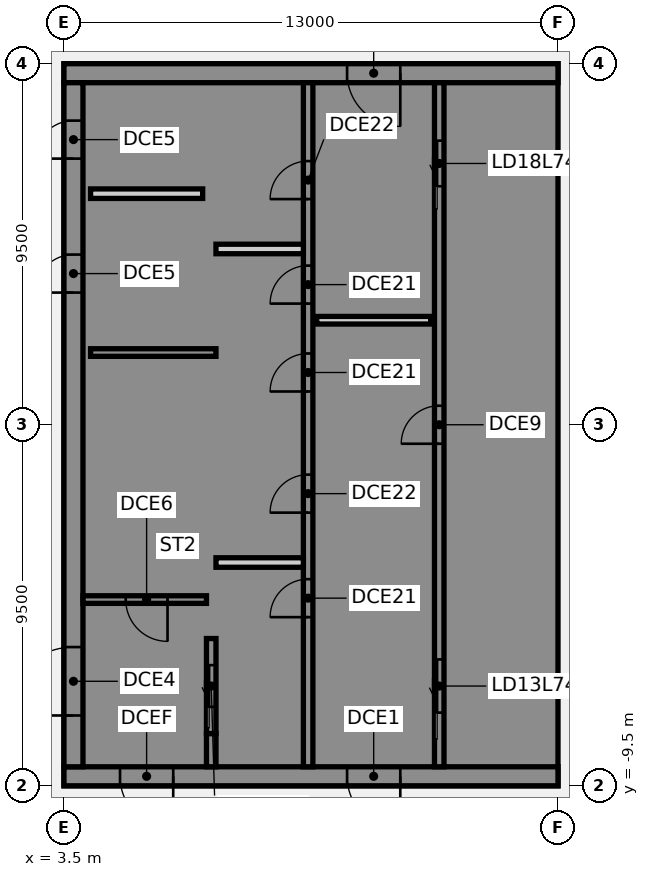
"""IFC4 building model, lengths in metres.
Left out: names, types, materials, properties, quantities, classifications, styles, units other than length and angle.
Written with IfcOpenShell. Run it as: python <this file> out.ifc"""

import sys

from ifc_helpers import new_model, si_unit, direction, frame, frame_2d, origin, place, context, subcontext, project, spatial, polyline, rectangle, outline, extrude, element, fill, save


model = new_model("IFC4")
c1 = context("Model", 3, precision=1e-05, world=origin(), true_north=direction((0.0, 1.0)))
c2 = subcontext(c1, "Body", "Model", "MODEL_VIEW")
j1 = project(units=[si_unit("LENGTHUNIT", "METRE"), si_unit("PLANEANGLEUNIT", "RADIAN")], contexts=[c1])
p1 = place(None, origin())
s1 = spatial("IfcSite", under=j1, at=p1, CompositionType="ELEMENT")
p2 = place(p1, origin())
s2 = spatial("IfcBuilding", under=s1, at=p2, CompositionType="ELEMENT")
p3 = place(p2, frame((0.0, 0.0, 299.4)))
s3 = spatial("IfcBuildingStorey", under=s2, at=p3, CompositionType="ELEMENT", Elevation=299.4)
p4 = place(p3, frame((16.5, -9.25, 0.0), z_axis=(0.0, 0.0, 1.0), x_axis=(-1.0, 0.0, 0.0)))
e1 = element("IfcWall", 1, at=p4, inside=s3, PredefinedType="SHEAR", context=c2, shape_type="SweptSolid", body=[
    extrude(rectangle(XDim=13.0, YDim=0.5, at=frame_2d((6.5, 0.0))), origin(), (0.0, 0.0, 1.0), 5.82),
])
p5 = place(p4, frame((4.15, 0.0, 0.0)))
e2 = element("IfcOpeningElement", 2, at=p5, cuts=e1, PredefinedType="OPENING", context=c2, shape_type="SweptSolid", body=[
    extrude(rectangle(XDim=1.4, YDim=2.1, at=frame_2d((0.7, 1.05))), frame((0.0, 0.26, 0.0), z_axis=(0.0, -1.0, 0.0), x_axis=(1.0, 0.0, 0.0)), (0.0, 0.0, 1.0), 0.52),
])
p6 = place(p4, frame((10.125, 0.0, 0.0)))
e3 = element("IfcOpeningElement", 3, at=p6, cuts=e1, PredefinedType="OPENING", context=c2, shape_type="SweptSolid", body=[
    extrude(rectangle(XDim=1.4, YDim=2.1, at=frame_2d((0.7, 1.05))), frame((0.0, 0.26, 0.0), z_axis=(0.0, -1.0, 0.0), x_axis=(1.0, 0.0, 0.0)), (0.0, 0.0, 1.0), 0.52),
])
p7 = place(p3, frame((16.5, 9.25, 0.0), z_axis=(0.0, 0.0, 1.0), x_axis=(-1.0, 0.0, 0.0)))
e4 = element("IfcWall", 4, at=p7, inside=s3, PredefinedType="SHEAR", context=c2, shape_type="SweptSolid", body=[
    extrude(rectangle(XDim=13.0, YDim=0.5, at=frame_2d((6.5, 0.0))), origin(), (0.0, 0.0, 1.0), 5.82),
])
p8 = place(p7, frame((4.15, 0.0, 0.0)))
e5 = element("IfcOpeningElement", 5, at=p8, cuts=e4, PredefinedType="OPENING", context=c2, shape_type="SweptSolid", body=[
    extrude(rectangle(XDim=1.4, YDim=2.1, at=frame_2d((0.7, 1.05))), frame((0.0, 0.26, 0.0), z_axis=(0.0, -1.0, 0.0), x_axis=(1.0, 0.0, 0.0)), (0.0, 0.0, 1.0), 0.52),
])
p9 = place(p3, frame((13.15, 2.75, 0.0), z_axis=(0.0, 0.0, 1.0), x_axis=(-1.0, 0.0, 0.0)))
e6 = element("IfcWall", 6, at=p9, inside=s3, PredefinedType="PARTITIONING", context=c2, shape_type="SweptSolid", body=[
    extrude(rectangle(XDim=3.0, YDim=0.2, at=frame_2d((1.5, 0.0))), origin(), (0.0, 0.0, 1.0), 5.82),
])
p10 = place(p3, origin())
e7 = element("IfcWall", 7, at=p10, inside=s3, PredefinedType="SHEAR", context=c2, shape_type="SweptSolid", body=[
    extrude(outline(polyline([(13.5, -8.125), (13.5, -9.0), (16.0, -9.0), (16.5, -9.0), (16.5, 9.0), (16.0, 9.0), (13.5, 9.0), (13.5, 8.125), (16.0, 8.125), (16.0, 5.625), (13.5, 5.625), (13.5, 5.375), (16.0, 5.375), (16.0, -5.375), (13.5, -5.375), (13.5, -5.625), (16.0, -5.625), (16.0, -8.125), (13.5, -8.125)])), origin(), (0.0, 0.0, 1.0), 5.82),
])
p11 = place(p3, origin())
e8 = element("IfcWall", 8, at=p11, inside=s3, PredefinedType="SHEAR", context=c2, shape_type="SweptSolid", body=[
    extrude(outline(polyline([(9.8, -5.625), (9.8, -5.375), (7.5, -5.375), (7.5, 8.125), (9.8, 8.125), (9.8, 9.0), (7.5, 9.0), (7.25, 9.0), (7.25, -5.625), (7.5, -5.625), (9.8, -5.625)])), origin(), (0.0, 0.0, 1.0), 5.82),
])
p12 = place(p3, origin())
e9 = element("IfcWall", 9, at=p12, inside=s3, PredefinedType="SHEAR", context=c2, shape_type="SweptSolid", body=[
    extrude(outline(polyline([(7.5, -8.125), (7.5, -9.0), (9.8, -9.0), (9.8, -8.125), (9.8, -5.625), (9.55, -5.625), (9.55, -8.125), (7.5, -8.125)])), origin(), (0.0, 0.0, 1.0), 5.82),
])
p13 = place(p3, frame((7.375, -9.0, 0.0), z_axis=(0.0, 0.0, 1.0), x_axis=(0.0, 1.0, 0.0)))
e10 = element("IfcWall", 10, at=p13, inside=s3, PredefinedType="SHEAR", context=c2, shape_type="SweptSolid", body=[
    extrude(rectangle(XDim=0.875, YDim=0.25, at=frame_2d((0.438, 0.0))), origin(), (0.0, 0.0, 1.0), 5.82),
])
p14 = place(p3, frame((7.5, 1.9, 0.0), z_axis=(0.0, 0.0, 1.0), x_axis=(-1.0, 0.0, 0.0)))
e11 = element("IfcWall", 11, at=p14, inside=s3, PredefinedType="SHEAR", context=c2, shape_type="SweptSolid", body=[
    extrude(rectangle(XDim=3.3, YDim=0.2, at=frame_2d((1.65, 0.0))), origin(), (0.0, 0.0, 1.0), 5.82),
])
p15 = place(p3, frame((13.375, -9.0, 0.0), z_axis=(0.0, 0.0, 1.0), x_axis=(0.0, 1.0, 0.0)))
e12 = element("IfcWall", 12, at=p15, inside=s3, PredefinedType="SHEAR", context=c2, shape_type="SweptSolid", body=[
    extrude(rectangle(XDim=18.0, YDim=0.25, at=frame_2d((9.0, 0.0))), origin(), (0.0, 0.0, 1.0), 5.82),
])
p16 = place(p15, frame((1.425, 0.0, 0.0)))
e13 = element("IfcOpeningElement", 13, at=p16, cuts=e12, PredefinedType="OPENING", context=c2, shape_type="SweptSolid", body=[
    extrude(rectangle(XDim=1.4, YDim=2.1, at=frame_2d((0.7, 1.05))), frame((0.0, 0.135, 0.0), z_axis=(0.0, -1.0, 0.0), x_axis=(1.0, 0.0, 0.0)), (0.0, 0.0, 1.0), 0.27),
])
p17 = place(p15, frame((15.275, 0.0, 0.0)))
e14 = element("IfcOpeningElement", 14, at=p17, cuts=e12, PredefinedType="OPENING", context=c2, shape_type="SweptSolid", body=[
    extrude(rectangle(XDim=1.2, YDim=2.1, at=frame_2d((0.6, 1.05))), frame((0.0, 0.135, 0.0), z_axis=(0.0, -1.0, 0.0), x_axis=(1.0, 0.0, 0.0)), (0.0, 0.0, 1.0), 0.27),
])
p18 = place(p15, frame((8.5, 0.0, 0.0)))
e15 = element("IfcOpeningElement", 15, at=p18, cuts=e12, PredefinedType="OPENING", context=c2, shape_type="SweptSolid", body=[
    extrude(rectangle(XDim=1.0, YDim=2.1, at=frame_2d((0.5, 1.05))), frame((0.0, 0.135, 0.0), z_axis=(0.0, -1.0, 0.0), x_axis=(1.0, 0.0, 0.0)), (0.0, 0.0, 1.0), 0.27),
])
p19 = place(p3, frame((9.925, -9.0, 0.0), z_axis=(0.0, 0.0, 1.0), x_axis=(0.0, 1.0, 0.0)))
e16 = element("IfcWall", 16, at=p19, inside=s3, PredefinedType="SHEAR", context=c2, shape_type="SweptSolid", body=[
    extrude(rectangle(XDim=18.0, YDim=0.25, at=frame_2d((9.0, 0.0))), origin(), (0.0, 0.0, 1.0), 5.82),
])
p20 = place(p19, frame((3.938, 0.0, 0.0)))
e17 = element("IfcOpeningElement", 17, at=p20, cuts=e16, PredefinedType="OPENING", context=c2, shape_type="SweptSolid", body=[
    extrude(rectangle(XDim=1.0, YDim=2.1, at=frame_2d((0.5, 1.05))), frame((0.0, 0.135, 0.0), z_axis=(0.0, -1.0, 0.0), x_axis=(1.0, 0.0, 0.0)), (0.0, 0.0, 1.0), 0.27),
])
p21 = place(p19, frame((6.688, 0.0, 0.0)))
e18 = element("IfcOpeningElement", 18, at=p21, cuts=e16, PredefinedType="OPENING", context=c2, shape_type="SweptSolid", body=[
    extrude(rectangle(XDim=1.0, YDim=2.1, at=frame_2d((0.5, 1.05))), frame((0.0, 0.135, 0.0), z_axis=(0.0, -1.0, 0.0), x_axis=(1.0, 0.0, 0.0)), (0.0, 0.0, 1.0), 0.27),
])
p22 = place(p19, frame((9.875, 0.0, 0.0)))
e19 = element("IfcOpeningElement", 19, at=p22, cuts=e16, PredefinedType="OPENING", context=c2, shape_type="SweptSolid", body=[
    extrude(rectangle(XDim=1.0, YDim=2.1, at=frame_2d((0.5, 1.05))), frame((0.0, 0.135, 0.0), z_axis=(0.0, -1.0, 0.0), x_axis=(1.0, 0.0, 0.0)), (0.0, 0.0, 1.0), 0.27),
])
p23 = place(p19, frame((12.188, 0.0, 0.0)))
e20 = element("IfcOpeningElement", 20, at=p23, cuts=e16, PredefinedType="OPENING", context=c2, shape_type="SweptSolid", body=[
    extrude(rectangle(XDim=1.0, YDim=2.1, at=frame_2d((0.5, 1.05))), frame((0.0, 0.135, 0.0), z_axis=(0.0, -1.0, 0.0), x_axis=(1.0, 0.0, 0.0)), (0.0, 0.0, 1.0), 0.27),
])
p24 = place(p19, frame((14.938, 0.0, 0.0)))
e21 = element("IfcOpeningElement", 21, at=p24, cuts=e16, PredefinedType="OPENING", context=c2, shape_type="SweptSolid", body=[
    extrude(rectangle(XDim=1.0, YDim=2.1, at=frame_2d((0.5, 1.05))), frame((0.0, 0.135, 0.0), z_axis=(0.0, -1.0, 0.0), x_axis=(1.0, 0.0, 0.0)), (0.0, 0.0, 1.0), 0.27),
])
p25 = place(p3, frame((7.375, -8.125, 0.0), z_axis=(0.0, 0.0, 1.0), x_axis=(0.0, 1.0, 0.0)))
e22 = element("IfcWall", 22, at=p25, inside=s3, PredefinedType="SHEAR", context=c2, shape_type="SweptSolid", body=[
    extrude(rectangle(XDim=2.5, YDim=0.25, at=frame_2d((1.25, 0.0))), origin(), (0.0, 0.0, 1.0), 5.82),
])
p26 = place(p25, frame((0.7, 0.0, 0.0)))
e23 = element("IfcOpeningElement", 23, at=p26, cuts=e22, PredefinedType="OPENING", context=c2, shape_type="SweptSolid", body=[
    extrude(rectangle(XDim=1.1, YDim=2.1, at=frame_2d((0.55, 1.05))), frame((0.0, 0.135, 0.0), z_axis=(0.0, -1.0, 0.0), x_axis=(1.0, 0.0, 0.0)), (0.0, 0.0, 1.0), 0.27),
])
p27 = place(p3, frame((3.75, -9.0, 0.0), z_axis=(0.0, 0.0, 1.0), x_axis=(0.0, 1.0, 0.0)))
e24 = element("IfcWall", 24, at=p27, inside=s3, PredefinedType="SHEAR", context=c2, shape_type="SweptSolid", body=[
    extrude(rectangle(XDim=18.0, YDim=0.5, at=frame_2d((9.0, 0.0))), origin(), (0.0, 0.0, 1.0), 5.82),
])
p28 = place(p27, frame((1.35, 0.0, 0.0)))
e25 = element("IfcOpeningElement", 25, at=p28, cuts=e24, PredefinedType="OPENING", context=c2, shape_type="SweptSolid", body=[
    extrude(rectangle(XDim=1.8, YDim=2.1, at=frame_2d((0.9, 1.05))), frame((0.0, 0.26, 0.0), z_axis=(0.0, -1.0, 0.0), x_axis=(1.0, 0.0, 0.0)), (0.0, 0.0, 1.0), 0.52),
])
p29 = place(p27, frame((12.478, 0.0, 0.0)))
e26 = element("IfcOpeningElement", 26, at=p29, cuts=e24, PredefinedType="OPENING", context=c2, shape_type="SweptSolid", body=[
    extrude(rectangle(XDim=1.0, YDim=2.1, at=frame_2d((0.5, 1.05))), frame((0.0, 0.26, 0.0), z_axis=(0.0, -1.0, 0.0), x_axis=(1.0, 0.0, 0.0)), (0.0, 0.0, 1.0), 0.52),
])
p30 = place(p27, frame((16.002, 0.0, 0.0)))
e27 = element("IfcOpeningElement", 27, at=p30, cuts=e24, PredefinedType="OPENING", context=c2, shape_type="SweptSolid", body=[
    extrude(rectangle(XDim=1.0, YDim=2.1, at=frame_2d((0.5, 1.05))), frame((0.0, 0.26, 0.0), z_axis=(0.0, -1.0, 0.0), x_axis=(1.0, 0.0, 0.0)), (0.0, 0.0, 1.0), 0.52),
])
p31 = place(p3, frame((7.15, 6.08, 0.0), z_axis=(0.0, 0.0, 1.0), x_axis=(-1.0, 0.0, 0.0)))
e28 = element("IfcWall", 28, at=p31, inside=s3, PredefinedType="PARTITIONING", context=c2, shape_type="SweptSolid", body=[
    extrude(rectangle(XDim=2.95, YDim=0.25, at=frame_2d((1.475, 0.0))), origin(), (0.0, 0.0, 1.0), 5.82),
])
p32 = place(p3, frame((7.25, -4.6, 0.0), z_axis=(0.0, 0.0, 1.0), x_axis=(-1.0, 0.0, 0.0)))
e29 = element("IfcWall", 29, at=p32, inside=s3, PredefinedType="SHEAR", context=c2, shape_type="SweptSolid", body=[
    extrude(rectangle(XDim=3.25, YDim=0.2, at=frame_2d((1.625, 0.0))), origin(), (0.0, 0.0, 1.0), 5.82),
])
p33 = place(p32, frame((1.025, 0.0, 0.0)))
e30 = element("IfcOpeningElement", 30, at=p33, cuts=e29, PredefinedType="OPENING", context=c2, shape_type="SweptSolid", body=[
    extrude(rectangle(XDim=1.1, YDim=2.1, at=frame_2d((0.55, 1.05))), frame((0.0, 0.11, 0.0), z_axis=(0.0, -1.0, 0.0), x_axis=(1.0, 0.0, 0.0)), (0.0, 0.0, 1.0), 0.22),
])
for number, where, z_axis, x_axis in (
    (31, (9.8, -3.625, 0.0), (0.0, 0.0, 1.0), (-1.0, 0.0, 0.0)),
    (32, (9.8, 4.625, 0.0), (0.0, 0.0, 1.0), (-1.0, 0.0, 0.0)),
):
    element("IfcWall", number, at=place(p3, frame(where, z_axis=z_axis, x_axis=x_axis)), inside=s3, PredefinedType="PARTITIONING", context=c2, shape_type="SweptSolid", body=[
        extrude(rectangle(XDim=2.3, YDim=0.25, at=frame_2d((1.15, 0.0))), origin(), (0.0, 0.0, 1.0), 5.82),
    ])
p34 = place(p5, origin())
e33 = element("IfcDoor", 33, at=p34, inside=s3, OperationType="SINGLE_SWING_LEFT", PredefinedType="DOOR", context=c2, shape_type="SweptSolid", body=[
    extrude(rectangle(XDim=1.4, YDim=2.1, at=frame_2d((0.7, 1.05))), frame((0.0, 0.025, 0.0), z_axis=(0.0, -1.0, 0.0), x_axis=(1.0, 0.0, 0.0)), (0.0, 0.0, 1.0), 0.05),
])
fill(e2, e33)
p35 = place(p6, origin())
e34 = element("IfcDoor", 34, at=p35, inside=s3, OperationType="SINGLE_SWING_LEFT", PredefinedType="DOOR", context=c2, shape_type="SweptSolid", body=[
    extrude(rectangle(XDim=1.4, YDim=2.1, at=frame_2d((0.7, 1.05))), frame((0.0, 0.025, 0.0), z_axis=(0.0, -1.0, 0.0), x_axis=(1.0, 0.0, 0.0)), (0.0, 0.0, 1.0), 0.05),
])
fill(e3, e34)
p36 = place(p8, origin())
e35 = element("IfcDoor", 35, at=p36, inside=s3, OperationType="SINGLE_SWING_LEFT", PredefinedType="DOOR", context=c2, shape_type="SweptSolid", body=[
    extrude(rectangle(XDim=1.4, YDim=2.1, at=frame_2d((0.7, 1.05))), frame((0.0, 0.025, 0.0), z_axis=(0.0, -1.0, 0.0), x_axis=(1.0, 0.0, 0.0)), (0.0, 0.0, 1.0), 0.05),
])
fill(e5, e35)
p37 = place(p28, origin())
e36 = element("IfcDoor", 36, at=p37, inside=s3, OperationType="SINGLE_SWING_LEFT", PredefinedType="DOOR", context=c2, shape_type="SweptSolid", body=[
    extrude(rectangle(XDim=1.8, YDim=2.1, at=frame_2d((0.9, 1.05))), frame((0.0, 0.025, 0.0), z_axis=(0.0, -1.0, 0.0), x_axis=(1.0, 0.0, 0.0)), (0.0, 0.0, 1.0), 0.05),
])
fill(e25, e36)
p38 = place(p29, origin())
e37 = element("IfcDoor", 37, at=p38, inside=s3, OperationType="SINGLE_SWING_LEFT", PredefinedType="DOOR", context=c2, shape_type="SweptSolid", body=[
    extrude(rectangle(XDim=1.0, YDim=2.1, at=frame_2d((0.5, 1.05))), frame((0.0, -0.175, 0.0), z_axis=(0.0, -1.0, 0.0), x_axis=(1.0, 0.0, 0.0)), (0.0, 0.0, 1.0), 0.05),
])
fill(e26, e37)
p39 = place(p30, origin())
e38 = element("IfcDoor", 38, at=p39, inside=s3, OperationType="SINGLE_SWING_LEFT", PredefinedType="DOOR", context=c2, shape_type="SweptSolid", body=[
    extrude(rectangle(XDim=1.0, YDim=2.1, at=frame_2d((0.5, 1.05))), frame((0.0, -0.175, 0.0), z_axis=(0.0, -1.0, 0.0), x_axis=(1.0, 0.0, 0.0)), (0.0, 0.0, 1.0), 0.05),
])
fill(e27, e38)
p40 = place(p33, origin())
e39 = element("IfcDoor", 39, at=p40, inside=s3, OperationType="SINGLE_SWING_LEFT", PredefinedType="DOOR", context=c2, shape_type="SweptSolid", body=[
    extrude(rectangle(XDim=1.1, YDim=2.1, at=frame_2d((0.55, 1.05))), frame((0.0, 0.025, 0.0), z_axis=(0.0, -1.0, 0.0), x_axis=(1.0, 0.0, 0.0)), (0.0, 0.0, 1.0), 0.05),
])
fill(e30, e39)
p41 = place(p16, origin())
e40 = element("IfcDoor", 40, at=p41, inside=s3, OperationType="SLIDING_TO_LEFT", PredefinedType="DOOR", context=c2, shape_type="SweptSolid", body=[
    extrude(rectangle(XDim=1.4, YDim=2.1, at=frame_2d((0.7, 1.05))), frame((0.0, 0.025, 0.0), z_axis=(0.0, -1.0, 0.0), x_axis=(1.0, 0.0, 0.0)), (0.0, 0.0, 1.0), 0.05),
])
fill(e13, e40)
p42 = place(p17, origin())
e41 = element("IfcDoor", 41, at=p42, inside=s3, OperationType="SLIDING_TO_LEFT", PredefinedType="DOOR", context=c2, shape_type="SweptSolid", body=[
    extrude(rectangle(XDim=1.2, YDim=2.1, at=frame_2d((0.6, 1.05))), frame((0.0, 0.025, 0.0), z_axis=(0.0, -1.0, 0.0), x_axis=(1.0, 0.0, 0.0)), (0.0, 0.0, 1.0), 0.05),
])
fill(e14, e41)
p43 = place(p26, origin())
e42 = element("IfcDoor", 42, at=p43, inside=s3, OperationType="SLIDING_TO_LEFT", PredefinedType="DOOR", context=c2, shape_type="SweptSolid", body=[
    extrude(rectangle(XDim=1.1, YDim=2.1, at=frame_2d((0.55, 1.05))), frame((0.0, 0.025, 0.0), z_axis=(0.0, -1.0, 0.0), x_axis=(1.0, 0.0, 0.0)), (0.0, 0.0, 1.0), 0.05),
])
fill(e23, e42)
p44 = place(p18, origin())
e43 = element("IfcDoor", 43, at=p44, inside=s3, OperationType="SINGLE_SWING_LEFT", PredefinedType="DOOR", context=c2, shape_type="SweptSolid", body=[
    extrude(rectangle(XDim=1.0, YDim=2.1, at=frame_2d((0.5, 1.05))), frame((0.0, 0.025, 0.0), z_axis=(0.0, -1.0, 0.0), x_axis=(1.0, 0.0, 0.0)), (0.0, 0.0, 1.0), 0.05),
])
fill(e15, e43)
p45 = place(p20, origin())
e44 = element("IfcDoor", 44, at=p45, inside=s3, OperationType="SINGLE_SWING_LEFT", PredefinedType="DOOR", context=c2, shape_type="SweptSolid", body=[
    extrude(rectangle(XDim=1.0, YDim=2.1, at=frame_2d((0.5, 1.05))), frame((0.0, 0.025, 0.0), z_axis=(0.0, -1.0, 0.0), x_axis=(1.0, 0.0, 0.0)), (0.0, 0.0, 1.0), 0.05),
])
fill(e17, e44)
p46 = place(p21, origin())
e45 = element("IfcDoor", 45, at=p46, inside=s3, OperationType="SINGLE_SWING_LEFT", PredefinedType="DOOR", context=c2, shape_type="SweptSolid", body=[
    extrude(rectangle(XDim=1.0, YDim=2.1, at=frame_2d((0.5, 1.05))), frame((0.0, 0.025, 0.0), z_axis=(0.0, -1.0, 0.0), x_axis=(1.0, 0.0, 0.0)), (0.0, 0.0, 1.0), 0.05),
])
fill(e18, e45)
p47 = place(p22, origin())
e46 = element("IfcDoor", 46, at=p47, inside=s3, OperationType="SINGLE_SWING_LEFT", PredefinedType="DOOR", context=c2, shape_type="SweptSolid", body=[
    extrude(rectangle(XDim=1.0, YDim=2.1, at=frame_2d((0.5, 1.05))), frame((0.0, 0.025, 0.0), z_axis=(0.0, -1.0, 0.0), x_axis=(1.0, 0.0, 0.0)), (0.0, 0.0, 1.0), 0.05),
])
fill(e19, e46)
p48 = place(p23, origin())
e47 = element("IfcDoor", 47, at=p48, inside=s3, OperationType="SINGLE_SWING_LEFT", PredefinedType="DOOR", context=c2, shape_type="SweptSolid", body=[
    extrude(rectangle(XDim=1.0, YDim=2.1, at=frame_2d((0.5, 1.05))), frame((0.0, 0.025, 0.0), z_axis=(0.0, -1.0, 0.0), x_axis=(1.0, 0.0, 0.0)), (0.0, 0.0, 1.0), 0.05),
])
fill(e20, e47)
p49 = place(p24, origin())
e48 = element("IfcDoor", 48, at=p49, inside=s3, OperationType="SINGLE_SWING_LEFT", PredefinedType="DOOR", context=c2, shape_type="SweptSolid", body=[
    extrude(rectangle(XDim=1.0, YDim=2.1, at=frame_2d((0.5, 1.05))), frame((0.0, 0.025, 0.0), z_axis=(0.0, -1.0, 0.0), x_axis=(1.0, 0.0, 0.0)), (0.0, 0.0, 1.0), 0.05),
])
fill(e21, e48)
save(model, sys.argv[1])
